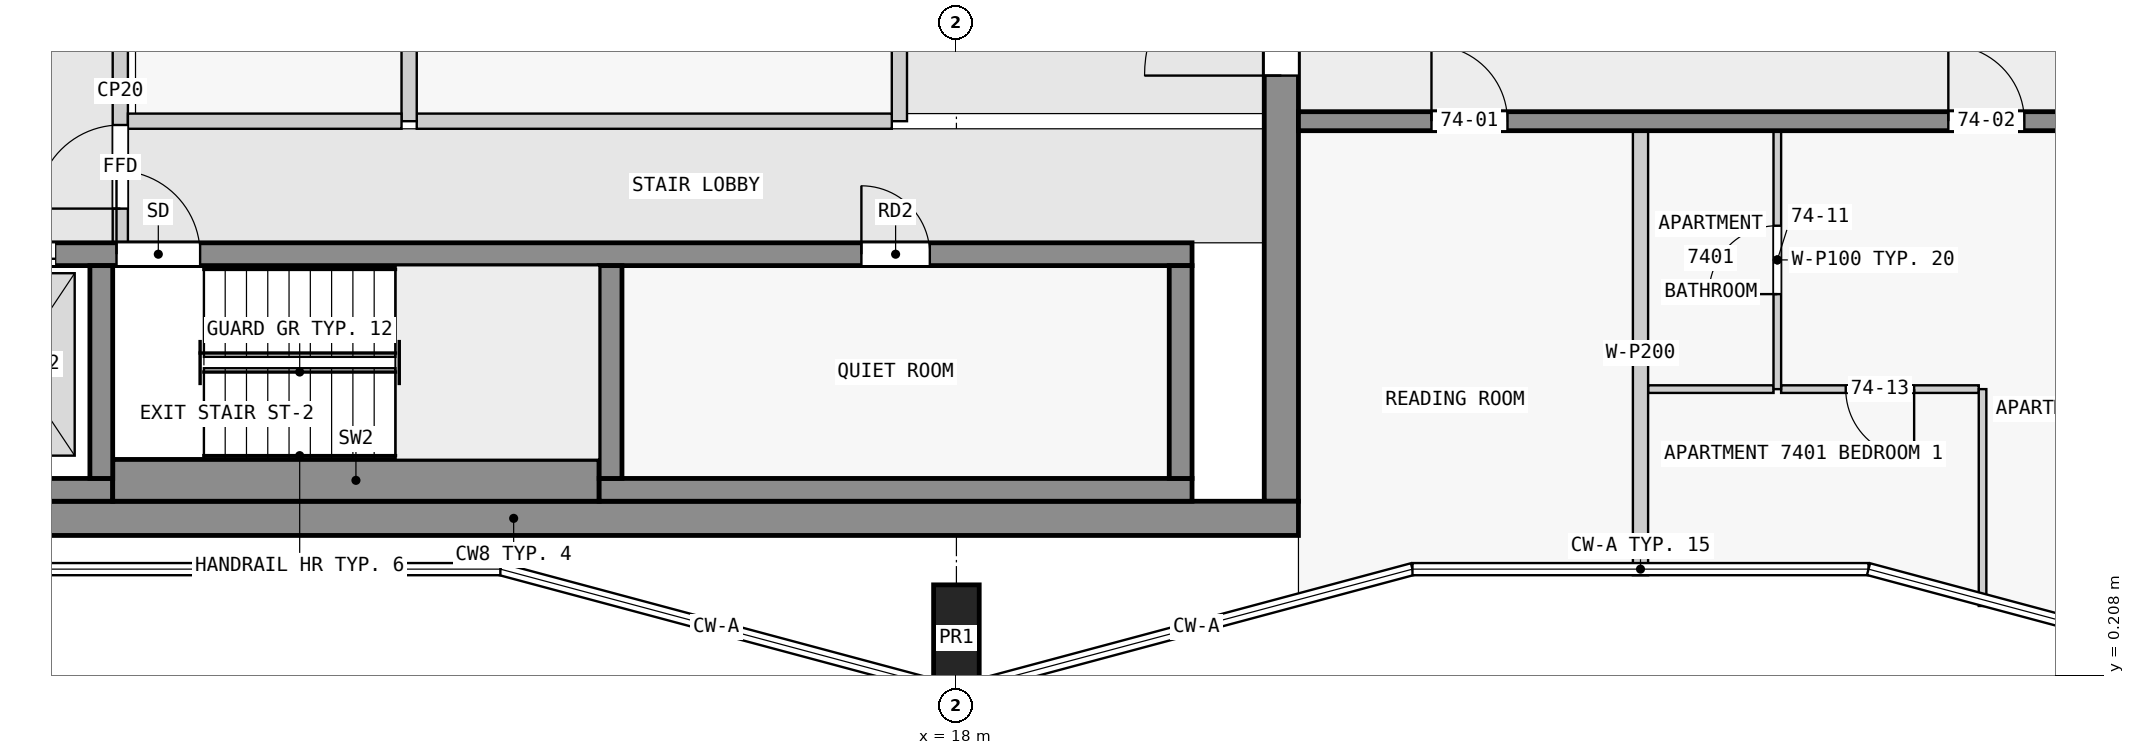
"""IFC4 building model, lengths in metres.
Left out: names, types, materials, properties, quantities, classifications, styles, units other than length and angle.
Written with IfcOpenShell. Run it as: python <this file> out.ifc"""

import sys

from ifc_helpers import new_model, si_unit, direction, frame, frame_2d, origin, origin_2d, place, context, subcontext, project, spatial, rectangle, extrude, element, fill, save


model = new_model("IFC4")
c1 = context("Model", 3, precision=1e-05, world=origin(), true_north=direction((0.0, 1.0)))
c2 = subcontext(c1, "Body", "Model", "MODEL_VIEW")
j1 = project(units=[si_unit("LENGTHUNIT", "METRE"), si_unit("PLANEANGLEUNIT", "RADIAN")], contexts=[c1])
p1 = place(None, origin())
s1 = spatial("IfcSite", under=j1, at=p1, CompositionType="ELEMENT")
p2 = place(p1, origin())
s2 = spatial("IfcBuilding", under=s1, at=p2, CompositionType="ELEMENT")
p3 = place(p2, frame((0.0, 0.0, 280.9)))
s3 = spatial("IfcBuildingStorey", under=s2, at=p3, CompositionType="ELEMENT", Elevation=280.9)
p4 = place(p3, frame((18.0, 0.7, 0.0), z_axis=(0.0, 0.0, 1.0), x_axis=(1.0, 0.0, 0.0)))
e1 = element("IfcColumn", 1, at=p4, inside=s3, PredefinedType="COLUMN", context=c2, shape_type="SweptSolid", body=[
    extrude(rectangle(XDim=0.6, YDim=1.4, at=origin_2d()), origin(), (0.0, 0.0, 1.0), 3.5),
])
p5 = place(p3, frame((1.85, 2.275, 0.0), z_axis=(0.0, 0.0, 1.0), x_axis=(1.0, 0.0, 0.0)))
e2 = element("IfcWall", 2, at=p5, inside=s3, PredefinedType="SHEAR", context=c2, shape_type="SweptSolid", body=[
    extrude(rectangle(XDim=20.65, YDim=0.45, at=frame_2d((10.325, 0.0))), origin(), (0.0, 0.0, 1.0), 3.25),
])
p6 = place(p3, frame((22.275, 2.5, 0.0), z_axis=(0.0, 0.0, 1.0), x_axis=(0.0, 1.0, 0.0)))
e3 = element("IfcWall", 3, at=p6, inside=s3, PredefinedType="SHEAR", context=c2, shape_type="SweptSolid", body=[
    extrude(rectangle(XDim=15.05, YDim=0.45, at=frame_2d((7.525, 0.0))), origin(), (0.0, 0.0, 1.0), 3.25),
])
p7 = place(p6, frame((5.6, 0.0, 0.0)))
e4 = element("IfcOpeningElement", 4, at=p7, cuts=e3, PredefinedType="OPENING", context=c2, shape_type="SweptSolid", body=[
    extrude(rectangle(XDim=1.8, YDim=2.1, at=frame_2d((0.9, 1.05))), frame((0.0, 0.235, 0.0), z_axis=(0.0, -1.0, 0.0), x_axis=(1.0, 0.0, 0.0)), (0.0, 0.0, 1.0), 0.47),
])
p8 = place(p3, frame((2.3, 2.65, 0.0), z_axis=(0.0, 0.0, 1.0), x_axis=(1.0, 0.0, 0.0)))
e5 = element("IfcWall", 5, at=p8, inside=s3, PredefinedType="SHEAR", context=c2, shape_type="SweptSolid", body=[
    extrude(rectangle(XDim=4.6, YDim=0.3, at=frame_2d((2.3, 0.0))), origin(), (0.0, 0.0, 1.0), 3.25),
])
p9 = place(p3, frame((6.9, 2.775, 0.0), z_axis=(0.0, 0.0, 1.0), x_axis=(1.0, 0.0, 0.0)))
e6 = element("IfcWall", 6, at=p9, inside=s3, PredefinedType="SHEAR", context=c2, shape_type="SweptSolid", body=[
    extrude(rectangle(XDim=6.4, YDim=0.55, at=frame_2d((3.2, 0.0))), origin(), (0.0, 0.0, 1.0), 3.25),
])
p10 = place(p3, frame((13.3, 2.65, 0.0), z_axis=(0.0, 0.0, 1.0), x_axis=(1.0, 0.0, 0.0)))
e7 = element("IfcWall", 7, at=p10, inside=s3, PredefinedType="SHEAR", context=c2, shape_type="SweptSolid", body=[
    extrude(rectangle(XDim=7.8, YDim=0.3, at=frame_2d((3.9, 0.0))), origin(), (0.0, 0.0, 1.0), 3.25),
])
for number, where, z_axis, x_axis in (
    (8, (6.75, 2.8, 0.0), (0.0, 0.0, 1.0), (0.0, 1.0, 0.0)),
    (9, (13.45, 2.8, 0.0), (0.0, 0.0, 1.0), (0.0, 1.0, 0.0)),
    (10, (20.95, 2.8, 0.0), (0.0, 0.0, 1.0), (0.0, 1.0, 0.0)),
):
    element("IfcWall", number, at=place(p3, frame(where, z_axis=z_axis, x_axis=x_axis)), inside=s3, PredefinedType="SHEAR", context=c2, shape_type="SweptSolid", body=[
        extrude(rectangle(XDim=2.8, YDim=0.3, at=frame_2d((1.4, 0.0))), origin(), (0.0, 0.0, 1.0), 3.25),
    ])
p11 = place(p3, frame((2.3, 5.75, 0.0), z_axis=(0.0, 0.0, 1.0), x_axis=(1.0, 0.0, 0.0)))
e11 = element("IfcWall", 11, at=p11, inside=s3, PredefinedType="SHEAR", context=c2, shape_type="SweptSolid", body=[
    extrude(rectangle(XDim=18.8, YDim=0.3, at=frame_2d((9.4, 0.0))), origin(), (0.0, 0.0, 1.0), 3.25),
])
p12 = place(p11, frame((4.65, 0.0, 0.0)))
e12 = element("IfcOpeningElement", 12, at=p12, cuts=e11, PredefinedType="OPENING", context=c2, shape_type="SweptSolid", body=[
    extrude(rectangle(XDim=1.1, YDim=2.1, at=frame_2d((0.55, 1.05))), frame((0.0, 0.16, 0.0), z_axis=(0.0, -1.0, 0.0), x_axis=(1.0, 0.0, 0.0)), (0.0, 0.0, 1.0), 0.32),
])
p13 = place(p11, frame((0.45, 0.0, 0.0)))
e13 = element("IfcOpeningElement", 13, at=p13, cuts=e11, PredefinedType="OPENING", context=c2, shape_type="SweptSolid", body=[
    extrude(rectangle(XDim=1.1, YDim=2.1, at=frame_2d((0.55, 1.05))), frame((0.0, 0.16, 0.0), z_axis=(0.0, -1.0, 0.0), x_axis=(1.0, 0.0, 0.0)), (0.0, 0.0, 1.0), 0.32),
])
p14 = place(p11, frame((2.75, 0.0, 0.0)))
e14 = element("IfcOpeningElement", 14, at=p14, cuts=e11, PredefinedType="OPENING", context=c2, shape_type="SweptSolid", body=[
    extrude(rectangle(XDim=1.1, YDim=2.1, at=frame_2d((0.55, 1.05))), frame((0.0, 0.16, 0.0), z_axis=(0.0, -1.0, 0.0), x_axis=(1.0, 0.0, 0.0)), (0.0, 0.0, 1.0), 0.32),
])
p15 = place(p11, frame((14.45, 0.0, 0.0)))
e15 = element("IfcOpeningElement", 15, at=p15, cuts=e11, PredefinedType="OPENING", context=c2, shape_type="SweptSolid", body=[
    extrude(rectangle(XDim=0.9, YDim=2.1, at=frame_2d((0.45, 1.05))), frame((0.0, 0.16, 0.0), z_axis=(0.0, -1.0, 0.0), x_axis=(1.0, 0.0, 0.0)), (0.0, 0.0, 1.0), 0.32),
])
p16 = place(p3, frame((22.5, 7.5, 0.0), z_axis=(0.0, 0.0, 1.0), x_axis=(1.0, 0.0, 0.0)))
e16 = element("IfcWall", 16, at=p16, inside=s3, PredefinedType="SHEAR", context=c2, shape_type="SweptSolid", body=[
    extrude(rectangle(XDim=22.5, YDim=0.25, at=frame_2d((11.25, 0.0))), origin(), (0.0, 0.0, 1.0), 3.25),
])
p17 = place(p16, frame((1.75, 0.0, 0.0)))
e17 = element("IfcOpeningElement", 17, at=p17, cuts=e16, PredefinedType="OPENING", context=c2, shape_type="SweptSolid", body=[
    extrude(rectangle(XDim=1.0, YDim=2.1, at=frame_2d((0.5, 1.05))), frame((0.0, 0.135, 0.0), z_axis=(0.0, -1.0, 0.0), x_axis=(1.0, 0.0, 0.0)), (0.0, 0.0, 1.0), 0.27),
])
p18 = place(p16, frame((8.55, 0.0, 0.0)))
e18 = element("IfcOpeningElement", 18, at=p18, cuts=e16, PredefinedType="OPENING", context=c2, shape_type="SweptSolid", body=[
    extrude(rectangle(XDim=1.0, YDim=2.1, at=frame_2d((0.5, 1.05))), frame((0.0, 0.135, 0.0), z_axis=(0.0, -1.0, 0.0), x_axis=(1.0, 0.0, 0.0)), (0.0, 0.0, 1.0), 0.27),
])
p19 = place(p16, frame((15.25, 0.0, 0.0)))
e19 = element("IfcOpeningElement", 19, at=p19, cuts=e16, PredefinedType="OPENING", context=c2, shape_type="SweptSolid", body=[
    extrude(rectangle(XDim=1.0, YDim=2.1, at=frame_2d((0.5, 1.05))), frame((0.0, 0.135, 0.0), z_axis=(0.0, -1.0, 0.0), x_axis=(1.0, 0.0, 0.0)), (0.0, 0.0, 1.0), 0.27),
])
p20 = place(p16, frame((18.75, 0.0, 0.0)))
e20 = element("IfcOpeningElement", 20, at=p20, cuts=e16, PredefinedType="OPENING", context=c2, shape_type="SweptSolid", body=[
    extrude(rectangle(XDim=0.9, YDim=2.1, at=frame_2d((0.45, 1.05))), frame((0.0, 0.135, 0.0), z_axis=(0.0, -1.0, 0.0), x_axis=(1.0, 0.0, 0.0)), (0.0, 0.0, 1.0), 0.27),
])
p21 = place(p16, frame((20.95, 0.0, 0.0)))
e21 = element("IfcOpeningElement", 21, at=p21, cuts=e16, PredefinedType="OPENING", context=c2, shape_type="SweptSolid", body=[
    extrude(rectangle(XDim=1.0, YDim=2.1, at=frame_2d((0.5, 1.05))), frame((0.0, 0.135, 0.0), z_axis=(0.0, -1.0, 0.0), x_axis=(1.0, 0.0, 0.0)), (0.0, 0.0, 1.0), 0.27),
])
p22 = place(p3, frame((7.0, 5.9, 0.0), z_axis=(0.0, 0.0, 1.0), x_axis=(0.0, 1.0, 0.0)))
e22 = element("IfcWall", 22, at=p22, inside=s3, PredefinedType="PARTITIONING", context=c2, shape_type="SweptSolid", body=[
    extrude(rectangle(XDim=4.0, YDim=0.2, at=frame_2d((2.0, 0.0))), origin(), (0.0, 0.0, 1.0), 3.25),
])
p23 = place(p22, frame((0.45, 0.0, 0.0)))
e23 = element("IfcOpeningElement", 23, at=p23, cuts=e22, PredefinedType="OPENING", context=c2, shape_type="SweptSolid", body=[
    extrude(rectangle(XDim=1.1, YDim=2.1, at=frame_2d((0.55, 1.05))), frame((0.0, 0.11, 0.0), z_axis=(0.0, -1.0, 0.0), x_axis=(1.0, 0.0, 0.0)), (0.0, 0.0, 1.0), 0.22),
])
p24 = place(p3, frame((7.1, 7.5, 0.0), z_axis=(0.0, 0.0, 1.0), x_axis=(1.0, 0.0, 0.0)))
e24 = element("IfcWall", 24, at=p24, inside=s3, PredefinedType="PARTITIONING", context=c2, shape_type="SweptSolid", body=[
    extrude(rectangle(XDim=3.6, YDim=0.2, at=frame_2d((1.8, 0.0))), origin(), (0.0, 0.0, 1.0), 3.25),
])
p25 = place(p3, frame((10.8, 7.5, 0.0), z_axis=(0.0, 0.0, 1.0), x_axis=(0.0, 1.0, 0.0)))
e25 = element("IfcWall", 25, at=p25, inside=s3, PredefinedType="PARTITIONING", context=c2, shape_type="SweptSolid", body=[
    extrude(rectangle(XDim=4.7, YDim=0.2, at=frame_2d((2.35, 0.0))), origin(), (0.0, 0.0, 1.0), 3.25),
])
p26 = place(p3, frame((10.9, 7.5, 0.0), z_axis=(0.0, 0.0, 1.0), x_axis=(1.0, 0.0, 0.0)))
e26 = element("IfcWall", 26, at=p26, inside=s3, PredefinedType="PARTITIONING", context=c2, shape_type="SweptSolid", body=[
    extrude(rectangle(XDim=6.25, YDim=0.2, at=frame_2d((3.125, 0.0))), origin(), (0.0, 0.0, 1.0), 3.25),
])
p27 = place(p3, frame((17.25, 7.5, 0.0), z_axis=(0.0, 0.0, 1.0), x_axis=(0.0, 1.0, 0.0)))
e27 = element("IfcWall", 27, at=p27, inside=s3, PredefinedType="PARTITIONING", context=c2, shape_type="SweptSolid", body=[
    extrude(rectangle(XDim=4.7, YDim=0.2, at=frame_2d((2.35, 0.0))), origin(), (0.0, 0.0, 1.0), 3.25),
])
p28 = place(p3, frame((31.45, 3.975, 0.0), z_axis=(0.0, 0.0, 1.0), x_axis=(-1.0, 0.0, 0.0)))
e28 = element("IfcWall", 28, at=p28, inside=s3, PredefinedType="PARTITIONING", context=c2, shape_type="SweptSolid", body=[
    extrude(rectangle(XDim=2.6, YDim=0.1, at=frame_2d((1.3, 0.0))), origin(), (0.0, 0.0, 1.0), 3.25),
])
p29 = place(p28, frame((0.85, 0.0, 0.0)))
e29 = element("IfcOpeningElement", 29, at=p29, cuts=e28, PredefinedType="OPENING", context=c2, shape_type="SweptSolid", body=[
    extrude(rectangle(XDim=0.9, YDim=2.1, at=frame_2d((0.45, 1.05))), frame((0.0, 0.06, 0.0), z_axis=(0.0, -1.0, 0.0), x_axis=(1.0, 0.0, 0.0)), (0.0, 0.0, 1.0), 0.12),
])
p30 = place(p3, frame((27.1, 3.975, 0.0), z_axis=(0.0, 0.0, 1.0), x_axis=(1.0, 0.0, 0.0)))
e30 = element("IfcWall", 30, at=p30, inside=s3, PredefinedType="PARTITIONING", context=c2, shape_type="SweptSolid", body=[
    extrude(rectangle(XDim=1.65, YDim=0.1, at=frame_2d((0.825, 0.0))), origin(), (0.0, 0.0, 1.0), 3.25),
])
p31 = place(p3, frame((27.0, 1.527, 0.0), z_axis=(0.0, 0.0, 1.0), x_axis=(0.0, 1.0, 0.0)))
e31 = element("IfcWall", 31, at=p31, inside=s3, PredefinedType="PARTITIONING", context=c2, shape_type="SweptSolid", body=[
    extrude(rectangle(XDim=5.848, YDim=0.2, at=frame_2d((2.924, 0.0))), origin(), (0.0, 0.0, 1.0), 3.25),
])
p32 = place(p3, frame((28.8, 3.975, 0.0), z_axis=(0.0, 0.0, 1.0), x_axis=(0.0, 1.0, 0.0)))
e32 = element("IfcWall", 32, at=p32, inside=s3, PredefinedType="PARTITIONING", context=c2, shape_type="SweptSolid", body=[
    extrude(rectangle(XDim=3.4, YDim=0.1, at=frame_2d((1.7, 0.0))), origin(), (0.0, 0.0, 1.0), 3.25),
])
p33 = place(p32, frame((1.25, 0.0, 0.0)))
e33 = element("IfcOpeningElement", 33, at=p33, cuts=e32, PredefinedType="OPENING", context=c2, shape_type="SweptSolid", body=[
    extrude(rectangle(XDim=0.9, YDim=2.1, at=frame_2d((0.45, 1.05))), frame((0.0, 0.06, 0.0), z_axis=(0.0, -1.0, 0.0), x_axis=(1.0, 0.0, 0.0)), (0.0, 0.0, 1.0), 0.12),
])
p34 = place(p3, frame((31.5, 1.122, 0.0), z_axis=(0.0, 0.0, 1.0), x_axis=(0.0, 1.0, 0.0)))
e34 = element("IfcWall", 34, at=p34, inside=s3, PredefinedType="PARTITIONING", context=c2, shape_type="SweptSolid", body=[
    extrude(rectangle(XDim=2.853, YDim=0.1, at=frame_2d((1.426, 0.0))), origin(), (0.0, 0.0, 1.0), 3.25),
])
p35 = place(p23, origin())
e35 = element("IfcDoor", 35, at=p35, inside=s3, OperationType="SINGLE_SWING_LEFT", PredefinedType="DOOR", context=c2, shape_type="SweptSolid", body=[
    extrude(rectangle(XDim=1.1, YDim=2.1, at=frame_2d((0.55, 1.05))), frame((0.0, 0.025, 0.0), z_axis=(0.0, -1.0, 0.0), x_axis=(1.0, 0.0, 0.0)), (0.0, 0.0, 1.0), 0.05),
])
fill(e23, e35)
p36 = place(p12, origin())
e36 = element("IfcDoor", 36, at=p36, inside=s3, OperationType="SINGLE_SWING_LEFT", PredefinedType="DOOR", context=c2, shape_type="SweptSolid", body=[
    extrude(rectangle(XDim=1.1, YDim=2.1, at=frame_2d((0.55, 1.05))), frame((0.0, 0.025, 0.0), z_axis=(0.0, -1.0, 0.0), x_axis=(1.0, 0.0, 0.0)), (0.0, 0.0, 1.0), 0.05),
])
fill(e12, e36)
p37 = place(p14, origin())
e37 = element("IfcDoor", 37, at=p37, inside=s3, OperationType="DOUBLE_DOOR_SLIDING", PredefinedType="DOOR", context=c2, shape_type="SweptSolid", body=[
    extrude(rectangle(XDim=1.1, YDim=2.1, at=frame_2d((0.55, 1.05))), frame((0.0, 0.025, 0.0), z_axis=(0.0, -1.0, 0.0), x_axis=(1.0, 0.0, 0.0)), (0.0, 0.0, 1.0), 0.05),
])
fill(e14, e37)
p38 = place(p7, origin())
e38 = element("IfcDoor", 38, at=p38, inside=s3, OperationType="DOUBLE_DOOR_SINGLE_SWING", PredefinedType="DOOR", context=c2, shape_type="SweptSolid", body=[
    extrude(rectangle(XDim=1.8, YDim=2.1, at=frame_2d((0.9, 1.05))), frame((0.0, 0.025, 0.0), z_axis=(0.0, -1.0, 0.0), x_axis=(1.0, 0.0, 0.0)), (0.0, 0.0, 1.0), 0.05),
])
fill(e4, e38)
p39 = place(p15, origin())
e39 = element("IfcDoor", 39, at=p39, inside=s3, OperationType="SINGLE_SWING_LEFT", PredefinedType="DOOR", context=c2, shape_type="SweptSolid", body=[
    extrude(rectangle(XDim=0.9, YDim=2.1, at=frame_2d((0.45, 1.05))), frame((0.0, 0.025, 0.0), z_axis=(0.0, -1.0, 0.0), x_axis=(1.0, 0.0, 0.0)), (0.0, 0.0, 1.0), 0.05),
])
fill(e15, e39)
p40 = place(p17, origin())
e40 = element("IfcDoor", 40, at=p40, inside=s3, OperationType="SINGLE_SWING_LEFT", PredefinedType="DOOR", context=c2, shape_type="SweptSolid", body=[
    extrude(rectangle(XDim=1.0, YDim=2.1, at=frame_2d((0.5, 1.05))), frame((0.0, 0.025, 0.0), z_axis=(0.0, -1.0, 0.0), x_axis=(1.0, 0.0, 0.0)), (0.0, 0.0, 1.0), 0.05),
])
fill(e17, e40)
p41 = place(p18, origin())
e41 = element("IfcDoor", 41, at=p41, inside=s3, OperationType="SINGLE_SWING_LEFT", PredefinedType="DOOR", context=c2, shape_type="SweptSolid", body=[
    extrude(rectangle(XDim=1.0, YDim=2.1, at=frame_2d((0.5, 1.05))), frame((0.0, 0.025, 0.0), z_axis=(0.0, -1.0, 0.0), x_axis=(1.0, 0.0, 0.0)), (0.0, 0.0, 1.0), 0.05),
])
fill(e18, e41)
p42 = place(p33, origin())
e42 = element("IfcDoor", 42, at=p42, inside=s3, OperationType="SINGLE_SWING_LEFT", PredefinedType="DOOR", context=c2, shape_type="SweptSolid", body=[
    extrude(rectangle(XDim=0.9, YDim=2.1, at=frame_2d((0.45, 1.05))), frame((0.0, 0.025, 0.0), z_axis=(0.0, -1.0, 0.0), x_axis=(1.0, 0.0, 0.0)), (0.0, 0.0, 1.0), 0.05),
])
fill(e33, e42)
p43 = place(p29, origin())
e43 = element("IfcDoor", 43, at=p43, inside=s3, OperationType="SINGLE_SWING_RIGHT", PredefinedType="DOOR", context=c2, shape_type="SweptSolid", body=[
    extrude(rectangle(XDim=0.9, YDim=2.1, at=frame_2d((0.45, 1.05))), frame((0.0, 0.025, 0.0), z_axis=(0.0, -1.0, 0.0), x_axis=(1.0, 0.0, 0.0)), (0.0, 0.0, 1.0), 0.05),
])
fill(e29, e43)
save(model, sys.argv[1])
